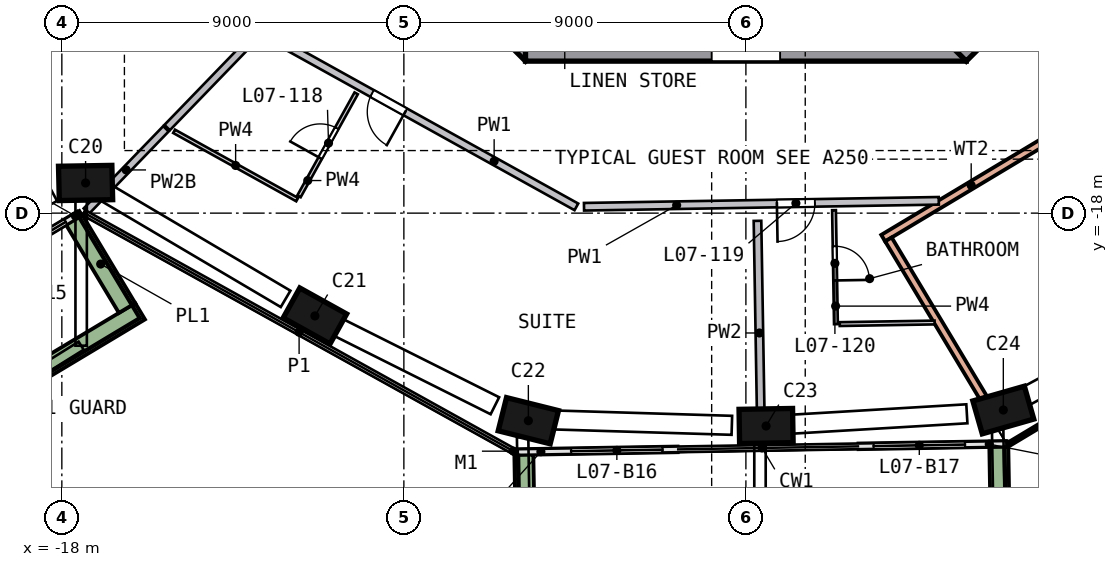
"""IFC4 building model, lengths in metres.
Left out: names, types, materials, properties, quantities, classifications, styles, units other than length and angle.
Written with IfcOpenShell. Run it as: python <this file> out.ifc"""

import sys

from ifc_helpers import new_model, si_unit, direction, frame, frame_2d, origin, origin_2d, place, context, subcontext, project, spatial, rectangle, extrude, element, fill, save


model = new_model("IFC4")
c1 = context("Model", 3, precision=1e-05, world=origin(), true_north=direction((0.0, 1.0)))
c2 = subcontext(c1, "Body", "Model", "MODEL_VIEW")
j1 = project(units=[si_unit("LENGTHUNIT", "METRE"), si_unit("PLANEANGLEUNIT", "RADIAN")], contexts=[c1])
p1 = place(None, origin())
s1 = spatial("IfcSite", under=j1, at=p1, CompositionType="ELEMENT")
p2 = place(p1, origin())
s2 = spatial("IfcBuilding", under=s1, at=p2, CompositionType="ELEMENT")
p3 = place(p2, frame((0.0, 0.0, 39.0)))
s3 = spatial("IfcBuildingStorey", under=s2, at=p3, CompositionType="ELEMENT", Elevation=39.0)
p4 = place(p3, frame((-17.474, -17.107, 0.0), z_axis=(0.082020711, -0.082400789, 0.993218361), x_axis=(-0.996491804, -0.023413495, 0.080348571)))
e1 = element("IfcColumn", 1, at=p4, inside=s3, PredefinedType="COLUMN", context=c2, shape_type="SweptSolid", body=[
    extrude(rectangle(XDim=1.4, YDim=0.9, at=origin_2d()), origin(), (0.0, 0.0, 1.0), 3.212),
])
p5 = place(p3, frame((-11.46, -20.64, 0.0), z_axis=(0.098637311, -0.053691551, 0.99367394), x_axis=(0.868690978, -0.482457023, -0.112299622)))
e2 = element("IfcColumn", 2, at=p5, inside=s3, PredefinedType="COLUMN", context=c2, shape_type="SweptSolid", body=[
    extrude(rectangle(XDim=1.4, YDim=0.9, at=origin_2d()), origin(), (0.0, 0.0, 1.0), 3.21),
])
p6 = place(p3, frame((-5.859, -23.43, 0.0), z_axis=(0.1116846, -0.026989812, 0.993377119), x_axis=(-0.963566831, 0.241532608, 0.114895435)))
e3 = element("IfcColumn", 3, at=p6, inside=s3, PredefinedType="COLUMN", context=c2, shape_type="SweptSolid", body=[
    extrude(rectangle(XDim=1.4, YDim=0.9, at=origin_2d()), origin(), (0.0, 0.0, 1.0), 3.211),
])
p7 = place(p3, frame((0.396, -23.605, 0.0), z_axis=(0.112325643, 0.002813845, 0.993667466), x_axis=(0.99353167, 0.016454511, -0.112356888)))
e4 = element("IfcColumn", 4, at=p7, inside=s3, PredefinedType="COLUMN", context=c2, shape_type="SweptSolid", body=[
    extrude(rectangle(XDim=1.4, YDim=0.9, at=origin_2d()), origin(), (0.0, 0.0, 1.0), 3.21),
])
p8 = place(p3, frame((6.641, -23.22, 0.0), z_axis=(0.110089596, 0.032464266, 0.993391339), x_axis=(-0.955177519, -0.272879455, 0.11477243)))
e5 = element("IfcColumn", 5, at=p8, inside=s3, PredefinedType="COLUMN", context=c2, shape_type="SweptSolid", body=[
    extrude(rectangle(XDim=1.4, YDim=0.9, at=origin_2d()), origin(), (0.0, 0.0, 1.0), 3.211),
])
p9 = place(p3, frame((-13.682, -5.481, 0.0), z_axis=(0.0, 0.0, 1.0), x_axis=(0.707106781, -0.707106781, 0.0)))
e6 = element("IfcWall", 6, at=p9, inside=s3, PredefinedType="SHEAR", context=c2, shape_type="SweptSolid", body=[
    extrude(rectangle(XDim=11.598, YDim=0.9, at=frame_2d((5.799, 0.0))), origin(), (0.0, 0.0, 1.0), 3.5),
])
p10 = place(p9, frame((2.099, 0.0, 0.0)))
e7 = element("IfcOpeningElement", 7, at=p10, cuts=e6, PredefinedType="OPENING", context=c2, shape_type="SweptSolid", body=[
    extrude(rectangle(XDim=1.2, YDim=2.1, at=frame_2d((0.6, 1.05))), frame((0.0, 0.46, 0.0), z_axis=(0.0, -1.0, 0.0), x_axis=(1.0, 0.0, 0.0)), (0.0, 0.0, 1.0), 0.92),
])
p11 = place(p3, frame((-5.799, -13.55, 0.0), z_axis=(0.0, 0.0, 1.0), x_axis=(1.0, 0.0, 0.0)))
e8 = element("IfcWall", 8, at=p11, inside=s3, PredefinedType="SHEAR", context=c2, shape_type="SweptSolid", body=[
    extrude(rectangle(XDim=11.598, YDim=0.9, at=frame_2d((5.799, 0.0))), origin(), (0.0, 0.0, 1.0), 3.5),
])
p12 = place(p11, frame((4.899, 0.0, 0.0)))
e9 = element("IfcOpeningElement", 9, at=p12, cuts=e8, PredefinedType="OPENING", context=c2, shape_type="SweptSolid", body=[
    extrude(rectangle(XDim=1.8, YDim=2.1, at=frame_2d((0.9, 1.05))), frame((0.0, 0.46, 0.0), z_axis=(0.0, -1.0, 0.0), x_axis=(1.0, 0.0, 0.0)), (0.0, 0.0, 1.0), 0.92),
])
p13 = place(p3, frame((5.481, -13.682, 0.0), z_axis=(0.0, 0.0, 1.0), x_axis=(0.707106781, 0.707106781, 0.0)))
e10 = element("IfcWall", 10, at=p13, inside=s3, PredefinedType="SHEAR", context=c2, shape_type="SweptSolid", body=[
    extrude(rectangle(XDim=11.598, YDim=0.9, at=frame_2d((5.799, 0.0))), origin(), (0.0, 0.0, 1.0), 3.5),
])
p14 = place(p13, frame((2.099, 0.0, 0.0)))
e11 = element("IfcOpeningElement", 11, at=p14, cuts=e10, PredefinedType="OPENING", context=c2, shape_type="SweptSolid", body=[
    extrude(rectangle(XDim=1.2, YDim=2.1, at=frame_2d((0.6, 1.05))), frame((0.0, 0.46, 0.0), z_axis=(0.0, -1.0, 0.0), x_axis=(1.0, 0.0, 0.0)), (0.0, 0.0, 1.0), 0.92),
])
p15 = place(p3, frame((-20.301, -19.671, 0.0), z_axis=(0.0, 0.0, 1.0), x_axis=(0.857526582, 0.514439657, 0.0)))
e12 = element("IfcWall", 12, at=p15, inside=s3, PredefinedType="SOLIDWALL", context=c2, shape_type="SweptSolid", body=[
    extrude(rectangle(XDim=3.2, YDim=0.15, at=frame_2d((1.6, 0.0))), origin(), (0.0, 0.0, 1.0), 2.425),
])
p16 = place(p15, frame((0.4, 0.0, 0.0)))
e13 = element("IfcOpeningElement", 13, at=p16, cuts=e12, PredefinedType="OPENING", context=c2, shape_type="SweptSolid", body=[
    extrude(rectangle(XDim=2.4, YDim=2.4, at=frame_2d((1.2, 1.2))), frame((0.0, 0.085, 0.0), z_axis=(0.0, -1.0, 0.0), x_axis=(1.0, 0.0, 0.0)), (0.0, 0.0, 1.0), 0.17),
])
p17 = place(p3, frame((-5.994, -24.287, 0.0), z_axis=(0.0, 0.0, 1.0), x_axis=(0.999859764, 0.016746706, 0.0)))
e14 = element("IfcWall", 14, at=p17, inside=s3, PredefinedType="SOLIDWALL", context=c2, shape_type="SweptSolid", body=[
    extrude(rectangle(XDim=4.198, YDim=0.15, at=frame_2d((2.099, 0.0))), origin(), (0.0, 0.0, 1.0), 2.425),
])
p18 = place(p17, frame((1.399, 0.0, 0.0)))
e15 = element("IfcOpeningElement", 15, at=p18, cuts=e14, PredefinedType="OPENING", context=c2, shape_type="SweptSolid", body=[
    extrude(rectangle(XDim=2.4, YDim=2.4, at=frame_2d((1.2, 1.2))), frame((0.0, 0.085, 0.0), z_axis=(0.0, -1.0, 0.0), x_axis=(1.0, 0.0, 0.0)), (0.0, 0.0, 1.0), 0.17),
])
p19 = place(p3, frame((2.963, -24.137, 0.0), z_axis=(0.0, 0.0, 1.0), x_axis=(0.999860055, 0.016729323, 0.0)))
e16 = element("IfcWall", 16, at=p19, inside=s3, PredefinedType="SOLIDWALL", context=c2, shape_type="SweptSolid", body=[
    extrude(rectangle(XDim=3.882, YDim=0.15, at=frame_2d((1.941, 0.0))), origin(), (0.0, 0.0, 1.0), 2.425),
])
p20 = place(p19, frame((0.4, 0.0, 0.0)))
e17 = element("IfcOpeningElement", 17, at=p20, cuts=e16, PredefinedType="OPENING", context=c2, shape_type="SweptSolid", body=[
    extrude(rectangle(XDim=2.4, YDim=2.4, at=frame_2d((1.2, 1.2))), frame((0.0, 0.085, 0.0), z_axis=(0.0, -1.0, 0.0), x_axis=(1.0, 0.0, 0.0)), (0.0, 0.0, 1.0), 0.17),
])
p21 = place(p3, frame((-25.045, -26.045, 0.0), z_axis=(0.0, 0.0, 1.0), x_axis=(0.857519302, 0.514451793, 0.0)))
e18 = element("IfcWall", 18, at=p21, inside=s3, PredefinedType="SOLIDWALL", context=c2, shape_type="SweptSolid", body=[
    extrude(rectangle(XDim=10.617, YDim=0.5, at=frame_2d((5.309, 0.0))), origin(), (0.0, 0.0, 1.0), 0.7),
])
p22 = place(p3, frame((-16.284, -20.497, 0.0), z_axis=(0.0, 0.0, 1.0), x_axis=(-0.514429241, 0.857532831, 0.0)))
e19 = element("IfcWall", 19, at=p22, inside=s3, PredefinedType="SOLIDWALL", context=c2, shape_type="SweptSolid", body=[
    extrude(rectangle(XDim=2.699, YDim=0.5, at=frame_2d((1.35, 0.0))), origin(), (0.0, 0.0, 1.0), 0.7),
])
p23 = place(p3, frame((-5.843, -24.361, 0.0), z_axis=(0.0, 0.0, 1.0), x_axis=(0.016790244, -0.999859034, 0.0)))
e20 = element("IfcWall", 20, at=p23, inside=s3, PredefinedType="SOLIDWALL", context=c2, shape_type="SweptSolid", body=[
    extrude(rectangle(XDim=3.199, YDim=0.5, at=frame_2d((1.6, 0.0))), origin(), (0.0, 0.0, 1.0), 0.7),
])
p24 = place(p3, frame((6.701, -26.85, 0.0), z_axis=(0.0, 0.0, 1.0), x_axis=(-0.01673368, 0.999859982, 0.0)))
e21 = element("IfcWall", 21, at=p24, inside=s3, PredefinedType="SOLIDWALL", context=c2, shape_type="SweptSolid", body=[
    extrude(rectangle(XDim=2.699, YDim=0.5, at=frame_2d((1.35, 0.0))), origin(), (0.0, 0.0, 1.0), 0.7),
])
p25 = place(p3, frame((14.761, -11.97, 0.0), z_axis=(0.0, 0.0, 1.0), x_axis=(-0.857527722, -0.514437758, 0.0)))
e22 = element("IfcWall", 22, at=p25, inside=s3, PredefinedType="SOLIDWALL", context=c2, shape_type="SweptSolid", body=[
    extrude(rectangle(XDim=13.0, YDim=0.2, at=frame_2d((6.5, 0.0))), origin(), (0.0, 0.0, 1.0), 3.19),
])
p26 = place(p25, frame((5.6, 0.0, 0.0)))
e23 = element("IfcOpeningElement", 23, at=p26, cuts=e22, PredefinedType="OPENING", context=c2, shape_type="SweptSolid", body=[
    extrude(rectangle(XDim=1.8, YDim=2.4, at=frame_2d((0.9, 1.2))), frame((0.0, 0.11, 0.0), z_axis=(0.0, -1.0, 0.0), x_axis=(1.0, 0.0, 0.0)), (0.0, 0.0, 1.0), 0.22),
])
p27 = place(p3, frame((6.251, -22.861, 0.0), z_axis=(0.0, 0.0, 1.0), x_axis=(-0.514444053, 0.857523945, 0.0)))
e24 = element("IfcWall", 24, at=p27, inside=s3, PredefinedType="SOLIDWALL", context=c2, shape_type="SweptSolid", body=[
    extrude(rectangle(XDim=4.861, YDim=0.2, at=frame_2d((2.431, 0.0))), origin(), (0.0, 0.0, 1.0), 3.19),
])
p28 = place(p3, frame((6.948, -24.062, 0.0), z_axis=(0.0, 0.0, 1.0), x_axis=(0.857521446, 0.514448219, 0.0)))
e25 = element("IfcWall", 25, at=p28, inside=s3, PredefinedType="SOLIDWALL", context=c2, shape_type="SweptSolid", body=[
    extrude(rectangle(XDim=12.84, YDim=0.1, at=frame_2d((6.42, 0.0))), origin(), (0.0, 0.0, 1.0), 0.7),
])
p29 = place(p3, frame((-30.901, -17.255, 0.0), z_axis=(0.0, 0.0, 1.0), x_axis=(0.857523845, 0.514444219, 0.0)))
e26 = element("IfcWall", 26, at=p29, inside=s3, PredefinedType="SOLIDWALL", context=c2, shape_type="SweptSolid", body=[
    extrude(rectangle(XDim=17.417, YDim=0.2, at=frame_2d((8.708, 0.0))), origin(), (0.0, 0.0, 1.0), 3.19),
])
p30 = place(p29, frame((9.55, 0.0, 0.0)))
e27 = element("IfcOpeningElement", 27, at=p30, cuts=e26, PredefinedType="OPENING", context=c2, shape_type="SweptSolid", body=[
    extrude(rectangle(XDim=1.0, YDim=2.1, at=frame_2d((0.5, 1.05))), frame((0.0, 0.11, 0.0), z_axis=(0.0, -1.0, 0.0), x_axis=(1.0, 0.0, 0.0)), (0.0, 0.0, 1.0), 0.22),
])
p31 = place(p3, frame((-14.662, -10.079, 0.0), z_axis=(0.0, 0.0, 1.0), x_axis=(-0.857528385, -0.514436652, 0.0)))
e28 = element("IfcWall", 28, at=p31, inside=s3, PredefinedType="SOLIDWALL", context=c2, shape_type="SweptSolid", body=[
    extrude(rectangle(XDim=17.617, YDim=0.2, at=frame_2d((8.809, 0.0))), origin(), (0.0, 0.0, 1.0), 3.19),
])
p32 = place(p31, frame((12.85, 0.0, 0.0)))
e29 = element("IfcOpeningElement", 29, at=p32, cuts=e28, PredefinedType="OPENING", context=c2, shape_type="SweptSolid", body=[
    extrude(rectangle(XDim=1.0, YDim=2.1, at=frame_2d((0.5, 1.05))), frame((0.0, 0.11, 0.0), z_axis=(0.0, -1.0, 0.0), x_axis=(1.0, 0.0, 0.0)), (0.0, 0.0, 1.0), 0.22),
])
p33 = place(p3, frame((-4.461, -17.835, 0.0), z_axis=(0.0, 0.0, 1.0), x_axis=(-0.874278393, 0.485424857, 0.0)))
e30 = element("IfcWall", 30, at=p33, inside=s3, PredefinedType="SOLIDWALL", context=c2, shape_type="SweptSolid", body=[
    extrude(rectangle(XDim=9.316, YDim=0.2, at=frame_2d((4.658, 0.0))), origin(), (0.0, 0.0, 1.0), 3.19),
])
p34 = place(p33, frame((5.15, 0.0, 0.0)))
e31 = element("IfcOpeningElement", 31, at=p34, cuts=e30, PredefinedType="OPENING", context=c2, shape_type="SweptSolid", body=[
    extrude(rectangle(XDim=1.0, YDim=2.1, at=frame_2d((0.5, 1.05))), frame((0.0, 0.11, 0.0), z_axis=(0.0, -1.0, 0.0), x_axis=(1.0, 0.0, 0.0)), (0.0, 0.0, 1.0), 0.22),
])
p35 = place(p3, frame((5.075, -17.676, 0.0), z_axis=(0.0, 0.0, 1.0), x_axis=(-0.999859501, -0.016762389, 0.0)))
e32 = element("IfcWall", 32, at=p35, inside=s3, PredefinedType="SOLIDWALL", context=c2, shape_type="SweptSolid", body=[
    extrude(rectangle(XDim=9.336, YDim=0.2, at=frame_2d((4.668, 0.0))), origin(), (0.0, 0.0, 1.0), 3.19),
])
p36 = place(p35, frame((3.26, 0.0, 0.0)))
e33 = element("IfcOpeningElement", 33, at=p36, cuts=e32, PredefinedType="OPENING", context=c2, shape_type="SweptSolid", body=[
    extrude(rectangle(XDim=1.0, YDim=2.1, at=frame_2d((0.5, 1.05))), frame((0.0, 0.11, 0.0), z_axis=(0.0, -1.0, 0.0), x_axis=(1.0, 0.0, 0.0)), (0.0, 0.0, 1.0), 0.22),
])
p37 = place(p3, frame((-15.26, -15.781, 0.0), z_axis=(0.0, 0.0, 1.0), x_axis=(-0.695171555, -0.718843869, 0.0)))
e34 = element("IfcWall", 34, at=p37, inside=s3, PredefinedType="SOLIDWALL", context=c2, shape_type="SweptSolid", body=[
    extrude(rectangle(XDim=3.011, YDim=0.2, at=frame_2d((1.506, 0.0))), origin(), (0.0, 0.0, 1.0), 2.69),
])
p38 = place(p3, frame((-13.091, -13.538, 0.0), z_axis=(0.0, 0.0, 1.0), x_axis=(-0.695176692, -0.718838902, 0.0)))
e35 = element("IfcWall", 35, at=p38, inside=s3, PredefinedType="SOLIDWALL", context=c2, shape_type="SweptSolid", body=[
    extrude(rectangle(XDim=3.075, YDim=0.2, at=frame_2d((1.537, 0.0))), origin(), (0.0, 0.0, 1.0), 3.19),
])
p39 = place(p3, frame((0.305, -18.203, 0.0), z_axis=(0.0, 0.0, 1.0), x_axis=(0.016750493, -0.999859701, 0.0)))
e36 = element("IfcWall", 36, at=p39, inside=s3, PredefinedType="SOLIDWALL", context=c2, shape_type="SweptSolid", body=[
    extrude(rectangle(XDim=5.903, YDim=0.2, at=frame_2d((2.951, 0.0))), origin(), (0.0, 0.0, 1.0), 3.19),
])
p40 = place(p3, frame((-11.808, -17.645, 0.0), z_axis=(0.0, 0.0, 1.0), x_axis=(-0.874266072, 0.485447046, 0.0)))
e37 = element("IfcWall", 37, at=p40, inside=s3, PredefinedType="PARTITIONING", context=c2, shape_type="SweptSolid", body=[
    extrude(rectangle(XDim=3.704, YDim=0.1, at=frame_2d((1.852, 0.0))), origin(), (0.0, 0.0, 1.0), 3.19),
])
p41 = place(p3, frame((-11.76, -17.557, 0.0), z_axis=(0.0, 0.0, 1.0), x_axis=(0.485449002, 0.874264986, 0.0)))
e38 = element("IfcWall", 38, at=p41, inside=s3, PredefinedType="PARTITIONING", context=c2, shape_type="SweptSolid", body=[
    extrude(rectangle(XDim=3.1, YDim=0.1, at=frame_2d((1.55, 0.0))), origin(), (0.0, 0.0, 1.0), 3.19),
])
p42 = place(p41, frame((1.15, 0.0, 0.0)))
e39 = element("IfcOpeningElement", 39, at=p42, cuts=e38, PredefinedType="OPENING", context=c2, shape_type="SweptSolid", body=[
    extrude(rectangle(XDim=0.9, YDim=2.1, at=frame_2d((0.45, 1.05))), frame((0.0, 0.06, 0.0), z_axis=(0.0, -1.0, 0.0), x_axis=(1.0, 0.0, 0.0)), (0.0, 0.0, 1.0), 0.12),
])
p43 = place(p3, frame((2.319, -17.922, 0.0), z_axis=(0.0, 0.0, 1.0), x_axis=(0.016764696, -0.999859463, 0.0)))
e40 = element("IfcWall", 40, at=p43, inside=s3, PredefinedType="PARTITIONING", context=c2, shape_type="SweptSolid", body=[
    extrude(rectangle(XDim=3.0, YDim=0.1, at=frame_2d((1.5, 0.0))), origin(), (0.0, 0.0, 1.0), 3.19),
])
p44 = place(p43, frame((0.95, 0.0, 0.0)))
e41 = element("IfcOpeningElement", 41, at=p44, cuts=e40, PredefinedType="OPENING", context=c2, shape_type="SweptSolid", body=[
    extrude(rectangle(XDim=0.9, YDim=2.1, at=frame_2d((0.45, 1.05))), frame((0.0, 0.06, 0.0), z_axis=(0.0, -1.0, 0.0), x_axis=(1.0, 0.0, 0.0)), (0.0, 0.0, 1.0), 0.12),
])
p45 = place(p3, frame((4.965, -20.878, 0.0), z_axis=(0.0, 0.0, 1.0), x_axis=(-0.999860133, -0.016724649, 0.0)))
e42 = element("IfcWall", 42, at=p45, inside=s3, PredefinedType="PARTITIONING", context=c2, shape_type="SweptSolid", body=[
    extrude(rectangle(XDim=2.496, YDim=0.1, at=frame_2d((1.248, 0.0))), origin(), (0.0, 0.0, 1.0), 3.19),
])
p46 = place(p16, origin())
e43 = element("IfcDoor", 43, at=p46, inside=s3, OperationType="SLIDING_TO_RIGHT", PredefinedType="DOOR", context=c2, shape_type="SweptSolid", body=[
    extrude(rectangle(XDim=2.4, YDim=2.4, at=frame_2d((1.2, 1.2))), frame((0.0, 0.025, 0.0), z_axis=(0.0, -1.0, 0.0), x_axis=(1.0, 0.0, 0.0)), (0.0, 0.0, 1.0), 0.05),
])
fill(e13, e43)
p47 = place(p18, origin())
e44 = element("IfcDoor", 44, at=p47, inside=s3, OperationType="SLIDING_TO_LEFT", PredefinedType="DOOR", context=c2, shape_type="SweptSolid", body=[
    extrude(rectangle(XDim=2.4, YDim=2.4, at=frame_2d((1.2, 1.2))), frame((0.0, 0.025, 0.0), z_axis=(0.0, -1.0, 0.0), x_axis=(1.0, 0.0, 0.0)), (0.0, 0.0, 1.0), 0.05),
])
fill(e15, e44)
p48 = place(p20, origin())
e45 = element("IfcDoor", 45, at=p48, inside=s3, OperationType="SLIDING_TO_RIGHT", PredefinedType="DOOR", context=c2, shape_type="SweptSolid", body=[
    extrude(rectangle(XDim=2.4, YDim=2.4, at=frame_2d((1.2, 1.2))), frame((0.0, 0.025, 0.0), z_axis=(0.0, -1.0, 0.0), x_axis=(1.0, 0.0, 0.0)), (0.0, 0.0, 1.0), 0.05),
])
fill(e17, e45)
p49 = place(p34, origin())
e46 = element("IfcDoor", 46, at=p49, inside=s3, OperationType="SINGLE_SWING_LEFT", PredefinedType="DOOR", context=c2, shape_type="SweptSolid", body=[
    extrude(rectangle(XDim=1.0, YDim=2.1, at=frame_2d((0.5, 1.05))), frame((0.0, 0.025, 0.0), z_axis=(0.0, -1.0, 0.0), x_axis=(1.0, 0.0, 0.0)), (0.0, 0.0, 1.0), 0.05),
])
fill(e31, e46)
p50 = place(p42, origin())
e47 = element("IfcDoor", 47, at=p50, inside=s3, OperationType="SINGLE_SWING_LEFT", PredefinedType="DOOR", context=c2, shape_type="SweptSolid", body=[
    extrude(rectangle(XDim=0.9, YDim=2.1, at=frame_2d((0.45, 1.05))), frame((0.0, 0.025, 0.0), z_axis=(0.0, -1.0, 0.0), x_axis=(1.0, 0.0, 0.0)), (0.0, 0.0, 1.0), 0.05),
])
fill(e39, e47)
p51 = place(p36, origin())
e48 = element("IfcDoor", 48, at=p51, inside=s3, OperationType="SINGLE_SWING_RIGHT", PredefinedType="DOOR", context=c2, shape_type="SweptSolid", body=[
    extrude(rectangle(XDim=1.0, YDim=2.1, at=frame_2d((0.5, 1.05))), frame((0.0, 0.025, 0.0), z_axis=(0.0, -1.0, 0.0), x_axis=(1.0, 0.0, 0.0)), (0.0, 0.0, 1.0), 0.05),
])
fill(e33, e48)
p52 = place(p44, origin())
e49 = element("IfcDoor", 49, at=p52, inside=s3, OperationType="SINGLE_SWING_RIGHT", PredefinedType="DOOR", context=c2, shape_type="SweptSolid", body=[
    extrude(rectangle(XDim=0.9, YDim=2.1, at=frame_2d((0.45, 1.05))), frame((0.0, 0.025, 0.0), z_axis=(0.0, -1.0, 0.0), x_axis=(1.0, 0.0, 0.0)), (0.0, 0.0, 1.0), 0.05),
])
fill(e41, e49)
save(model, sys.argv[1])
